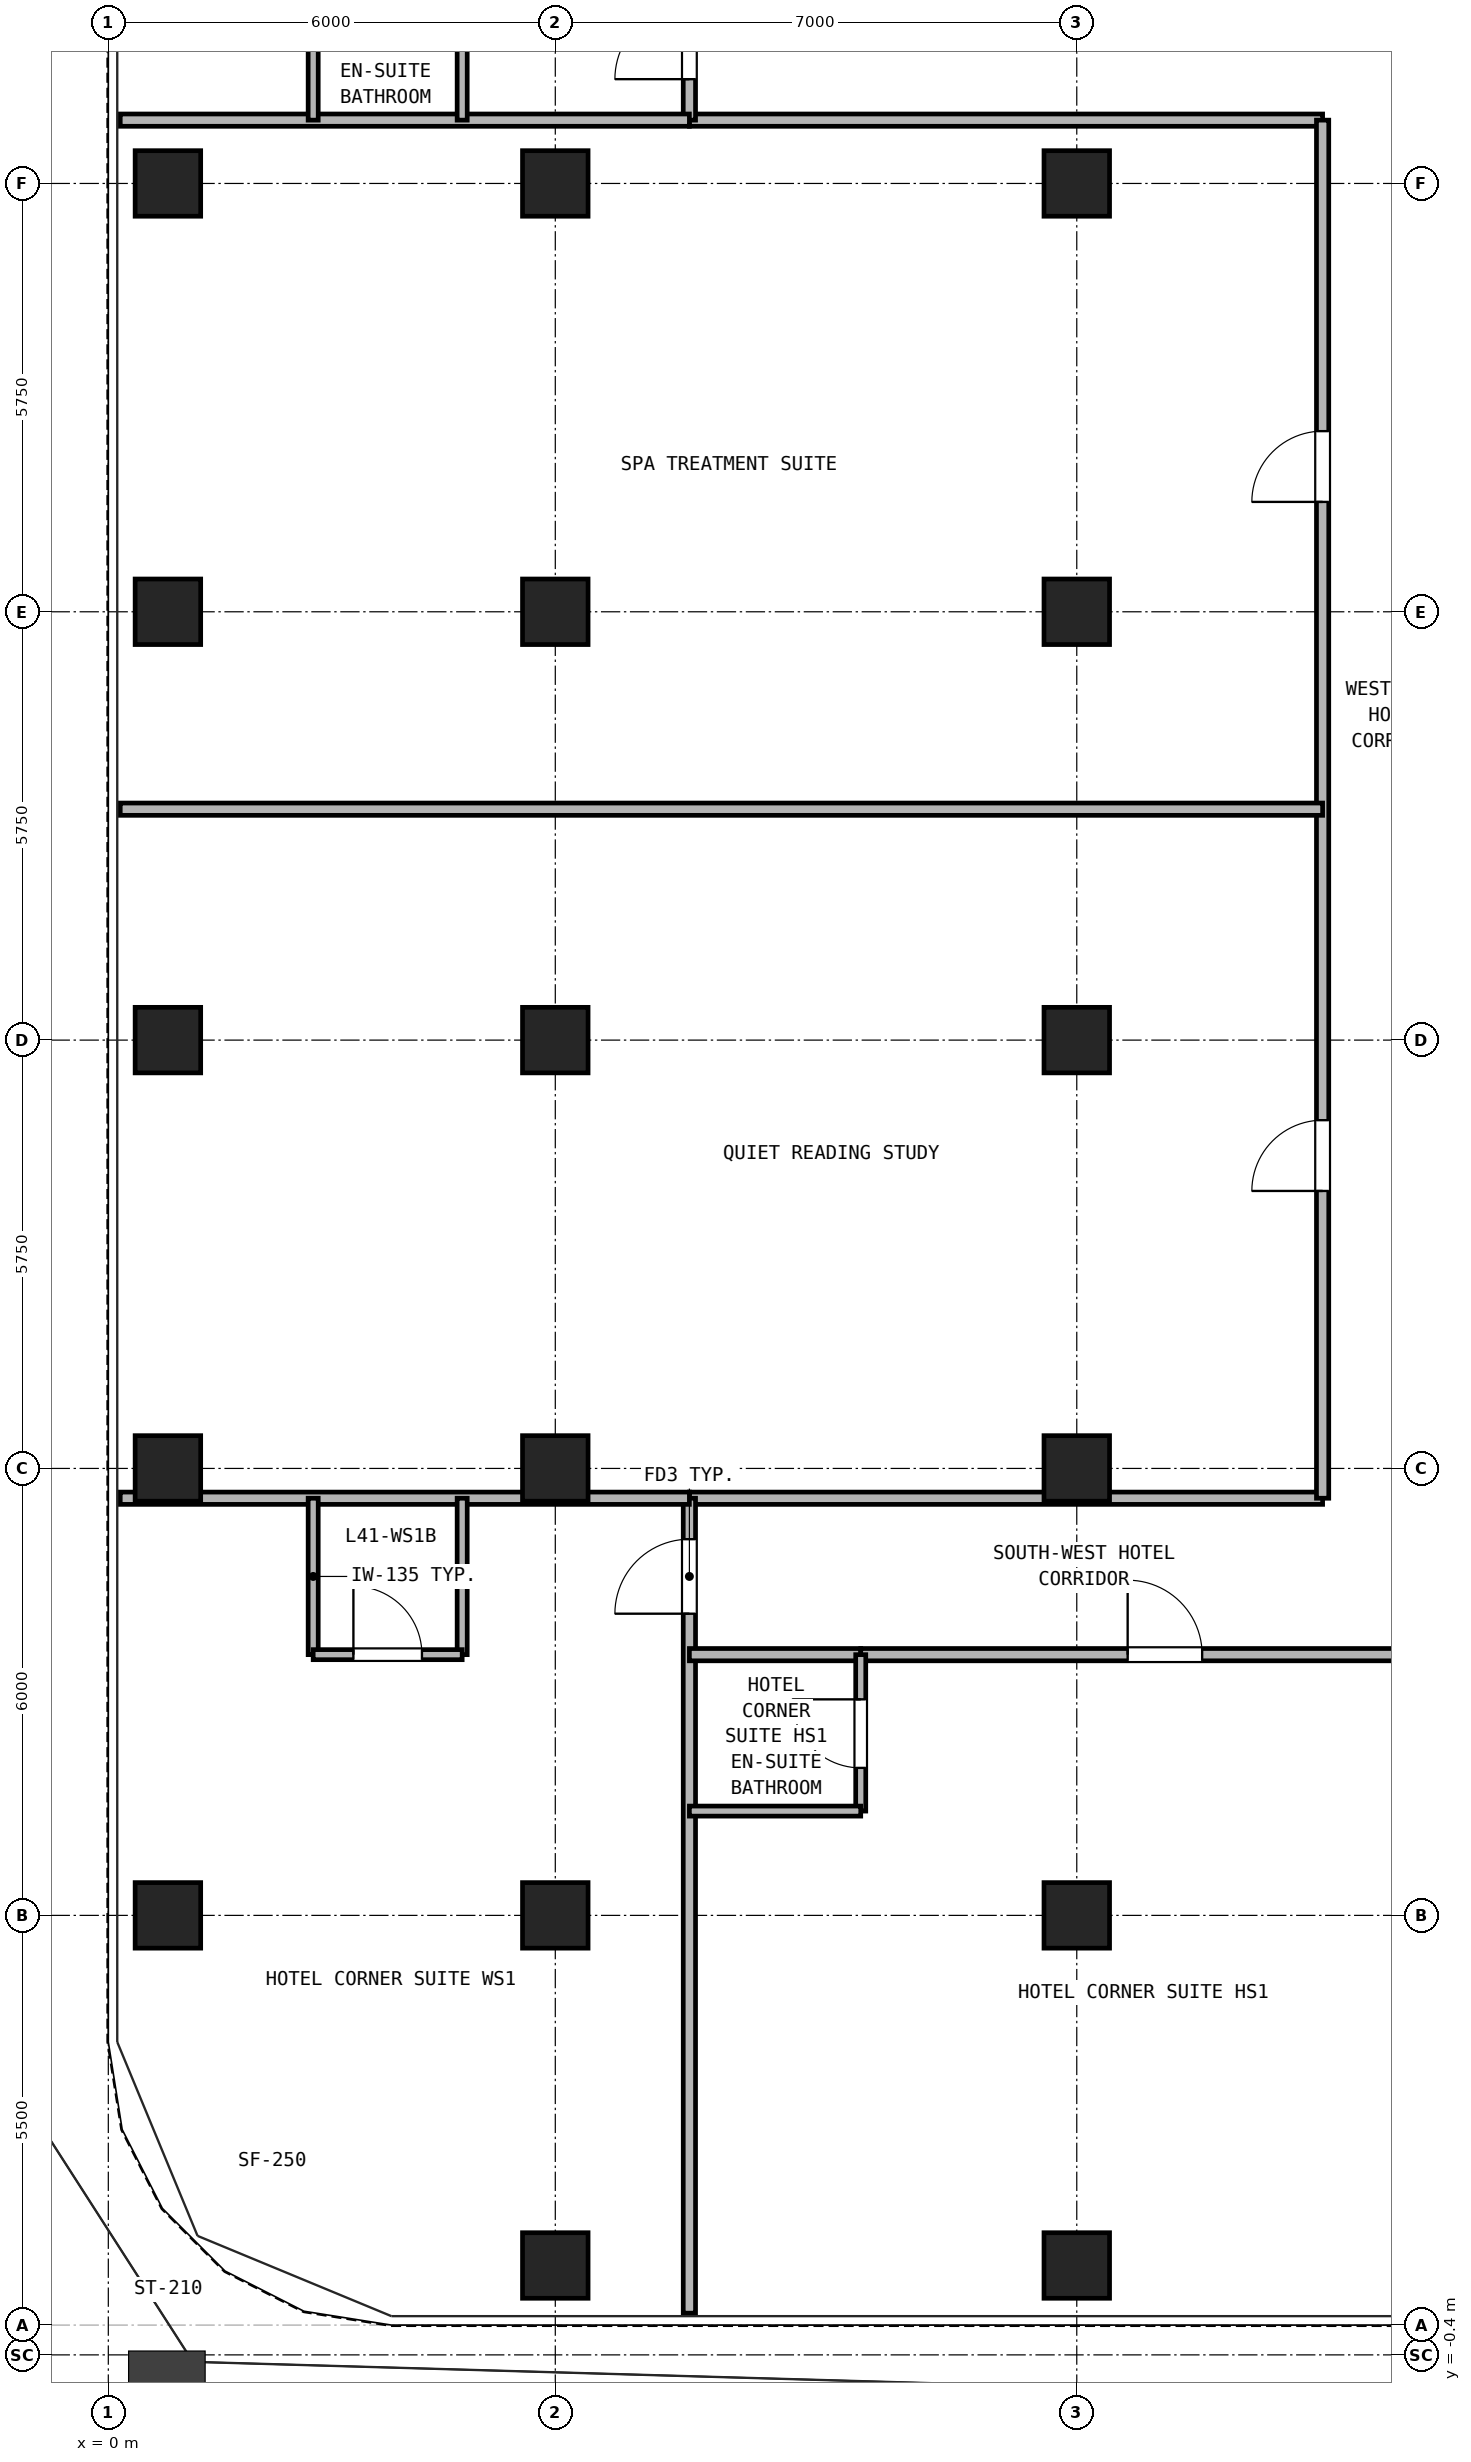
"""IFC4 building model, lengths in metres.
Left out: names, types, materials, properties, quantities, classifications, styles, units other than length and angle.
Written with IfcOpenShell. Run it as: python <this file> out.ifc"""

import sys

from ifc_helpers import new_model, si_unit, direction, frame, frame_2d, origin, origin_2d, place, context, subcontext, project, spatial, rectangle, hollow_rectangle, extrude, source, transform, mapped, element, fill, save


model = new_model("IFC4")
c1 = context("Model", 3, precision=1e-05, world=origin(), true_north=direction((0.0, 1.0)))
c2 = subcontext(c1, "Body", "Model", "MODEL_VIEW")
j1 = project(units=[si_unit("LENGTHUNIT", "METRE"), si_unit("PLANEANGLEUNIT", "RADIAN")], contexts=[c1])
p1 = place(None, origin())
s1 = spatial("IfcSite", under=j1, at=p1, CompositionType="ELEMENT")
p2 = place(p1, origin())
s2 = spatial("IfcBuilding", under=s1, at=p2, CompositionType="ELEMENT")
p3 = place(p2, frame((0.0, 0.0, 148.4)))
s3 = spatial("IfcBuildingStorey", under=s2, at=p3, CompositionType="ELEMENT", Elevation=148.4)
m1 = source(origin(), c2, "Body", "SweptSolid", [
    extrude(hollow_rectangle(XDim=0.88, YDim=0.88, WallThickness=0.05, at=origin_2d()), origin(), (0.0, 0.0, 1.0), 2.84),
])
for number, where, z_axis, x_axis in (
    (1, (6.0, 0.8, 0.0), (0.0, 0.0, 1.0), (1.0, 0.0, 0.0)),
    (2, (13.0, 0.8, 0.0), (0.0, 0.0, 1.0), (1.0, 0.0, 0.0)),
    (3, (0.8, 5.5, 0.0), (0.0, 0.0, 1.0), (1.0, 0.0, 0.0)),
    (4, (0.8, 11.5, 0.0), (0.0, 0.0, 1.0), (1.0, 0.0, 0.0)),
    (5, (0.8, 17.25, 0.0), (0.0, 0.0, 1.0), (1.0, 0.0, 0.0)),
    (6, (0.8, 23.0, 0.0), (0.0, 0.0, 1.0), (1.0, 0.0, 0.0)),
    (7, (0.8, 28.75, 0.0), (0.0, 0.0, 1.0), (1.0, 0.0, 0.0)),
    (8, (6.0, 5.5, 0.0), (0.0, 0.0, 1.0), (1.0, 0.0, 0.0)),
    (9, (6.0, 11.5, 0.0), (0.0, 0.0, 1.0), (1.0, 0.0, 0.0)),
    (10, (6.0, 17.25, 0.0), (0.0, 0.0, 1.0), (1.0, 0.0, 0.0)),
    (11, (6.0, 23.0, 0.0), (0.0, 0.0, 1.0), (1.0, 0.0, 0.0)),
    (12, (6.0, 28.75, 0.0), (0.0, 0.0, 1.0), (1.0, 0.0, 0.0)),
    (13, (13.0, 5.5, 0.0), (0.0, 0.0, 1.0), (1.0, 0.0, 0.0)),
    (14, (13.0, 11.5, 0.0), (0.0, 0.0, 1.0), (1.0, 0.0, 0.0)),
    (15, (13.0, 17.25, 0.0), (0.0, 0.0, 1.0), (1.0, 0.0, 0.0)),
    (16, (13.0, 23.0, 0.0), (0.0, 0.0, 1.0), (1.0, 0.0, 0.0)),
    (17, (13.0, 28.75, 0.0), (0.0, 0.0, 1.0), (1.0, 0.0, 0.0)),
):
    element("IfcColumn", number, at=place(p3, frame(where, z_axis=z_axis, x_axis=x_axis)), inside=s3, PredefinedType="COLUMN", context=c2, shape_type="MappedRepresentation", body=[
        mapped(m1, transform((0.0, 0.0, 0.0), x_axis=(1.0, 0.0, 0.0), y_axis=(0.0, 1.0, 0.0), z_axis=(0.0, 0.0, 1.0), scale=1.0)),
    ])
for number, where, z_axis, x_axis in (
    (18, (7.8, 11.1, 0.0), (0.0, 0.0, 1.0), (1.0, 0.0, 0.0)),
    (19, (7.8, 29.6, 0.0), (0.0, 0.0, 1.0), (1.0, 0.0, 0.0)),
):
    element("IfcWall", number, at=place(p3, frame(where, z_axis=z_axis, x_axis=x_axis)), inside=s3, PredefinedType="PARTITIONING", context=c2, shape_type="SweptSolid", body=[
        extrude(rectangle(XDim=8.5, YDim=0.165, at=frame_2d((4.25, 0.0))), origin(), (0.0, 0.0, 1.0), 2.84),
    ])
p4 = place(p3, frame((16.3, 11.1, 0.0), z_axis=(0.0, 0.0, 1.0), x_axis=(0.0, 1.0, 0.0)))
e20 = element("IfcWall", 20, at=p4, inside=s3, PredefinedType="PARTITIONING", context=c2, shape_type="SweptSolid", body=[
    extrude(rectangle(XDim=18.5, YDim=0.165, at=frame_2d((9.25, 0.0))), origin(), (0.0, 0.0, 1.0), 2.84),
])
p5 = place(p4, frame((4.125, 0.0, 0.0)))
e21 = element("IfcOpeningElement", 21, at=p5, cuts=e20, PredefinedType="OPENING", context=c2, shape_type="SweptSolid", body=[
    extrude(rectangle(XDim=0.95, YDim=2.15, at=frame_2d((0.475, 1.075))), frame((0.0, 0.093, 0.0), z_axis=(0.0, -1.0, 0.0), x_axis=(1.0, 0.0, 0.0)), (0.0, 0.0, 1.0), 0.185),
])
p6 = place(p4, frame((13.375, 0.0, 0.0)))
e22 = element("IfcOpeningElement", 22, at=p6, cuts=e20, PredefinedType="OPENING", context=c2, shape_type="SweptSolid", body=[
    extrude(rectangle(XDim=0.95, YDim=2.15, at=frame_2d((0.475, 1.075))), frame((0.0, 0.093, 0.0), z_axis=(0.0, -1.0, 0.0), x_axis=(1.0, 0.0, 0.0)), (0.0, 0.0, 1.0), 0.185),
])
p7 = place(p3, frame((7.8, 0.16, 0.0), z_axis=(0.0, 0.0, 1.0), x_axis=(0.0, 1.0, 0.0)))
e23 = element("IfcWall", 23, at=p7, inside=s3, PredefinedType="PARTITIONING", context=c2, shape_type="SweptSolid", body=[
    extrude(rectangle(XDim=10.94, YDim=0.165, at=frame_2d((5.47, 0.0))), origin(), (0.0, 0.0, 1.0), 2.84),
])
p8 = place(p7, frame((9.39, 0.0, 0.0)))
e24 = element("IfcOpeningElement", 24, at=p8, cuts=e23, PredefinedType="OPENING", context=c2, shape_type="SweptSolid", body=[
    extrude(rectangle(XDim=1.0, YDim=2.15, at=frame_2d((0.5, 1.075))), frame((0.0, 0.093, 0.0), z_axis=(0.0, -1.0, 0.0), x_axis=(1.0, 0.0, 0.0)), (0.0, 0.0, 1.0), 0.185),
])
p9 = place(p3, frame((7.8, 29.6, 0.0), z_axis=(0.0, 0.0, 1.0), x_axis=(0.0, 1.0, 0.0)))
e25 = element("IfcWall", 25, at=p9, inside=s3, PredefinedType="PARTITIONING", context=c2, shape_type="SweptSolid", body=[
    extrude(rectangle(XDim=5.54, YDim=0.165, at=frame_2d((2.77, 0.0))), origin(), (0.0, 0.0, 1.0), 2.84),
])
p10 = place(p9, frame((0.55, 0.0, 0.0)))
e26 = element("IfcOpeningElement", 26, at=p10, cuts=e25, PredefinedType="OPENING", context=c2, shape_type="SweptSolid", body=[
    extrude(rectangle(XDim=1.0, YDim=2.15, at=frame_2d((0.5, 1.075))), frame((0.0, 0.093, 0.0), z_axis=(0.0, -1.0, 0.0), x_axis=(1.0, 0.0, 0.0)), (0.0, 0.0, 1.0), 0.185),
])
for number, where, z_axis, x_axis in (
    (27, (0.16, 11.1, 0.0), (0.0, 0.0, 1.0), (1.0, 0.0, 0.0)),
    (28, (0.16, 29.6, 0.0), (0.0, 0.0, 1.0), (1.0, 0.0, 0.0)),
):
    element("IfcWall", number, at=place(p3, frame(where, z_axis=z_axis, x_axis=x_axis)), inside=s3, PredefinedType="PARTITIONING", context=c2, shape_type="SweptSolid", body=[
        extrude(rectangle(XDim=7.64, YDim=0.165, at=frame_2d((3.82, 0.0))), origin(), (0.0, 0.0, 1.0), 2.84),
    ])
for number, where, z_axis, x_axis in (
    (29, (2.75, 9.0, 0.0), (0.0, 0.0, 1.0), (0.0, 1.0, 0.0)),
    (30, (4.75, 9.0, 0.0), (0.0, 0.0, 1.0), (0.0, 1.0, 0.0)),
):
    element("IfcWall", number, at=place(p3, frame(where, z_axis=z_axis, x_axis=x_axis)), inside=s3, PredefinedType="PARTITIONING", context=c2, shape_type="SweptSolid", body=[
        extrude(rectangle(XDim=2.1, YDim=0.135, at=frame_2d((1.05, 0.0))), origin(), (0.0, 0.0, 1.0), 2.84),
    ])
p11 = place(p3, frame((2.75, 9.0, 0.0), z_axis=(0.0, 0.0, 1.0), x_axis=(1.0, 0.0, 0.0)))
e31 = element("IfcWall", 31, at=p11, inside=s3, PredefinedType="PARTITIONING", context=c2, shape_type="SweptSolid", body=[
    extrude(rectangle(XDim=2.0, YDim=0.135, at=frame_2d((1.0, 0.0))), origin(), (0.0, 0.0, 1.0), 2.84),
])
p12 = place(p11, frame((0.54, 0.0, 0.0)))
e32 = element("IfcOpeningElement", 32, at=p12, cuts=e31, PredefinedType="OPENING", context=c2, shape_type="SweptSolid", body=[
    extrude(rectangle(XDim=0.92, YDim=2.1, at=frame_2d((0.46, 1.05))), frame((0.0, 0.077, 0.0), z_axis=(0.0, -1.0, 0.0), x_axis=(1.0, 0.0, 0.0)), (0.0, 0.0, 1.0), 0.155),
])
for number, where, z_axis, x_axis in (
    (33, (2.75, 29.6, 0.0), (0.0, 0.0, 1.0), (0.0, 1.0, 0.0)),
    (34, (4.75, 29.6, 0.0), (0.0, 0.0, 1.0), (0.0, 1.0, 0.0)),
):
    element("IfcWall", number, at=place(p3, frame(where, z_axis=z_axis, x_axis=x_axis)), inside=s3, PredefinedType="PARTITIONING", context=c2, shape_type="SweptSolid", body=[
        extrude(rectangle(XDim=2.1, YDim=0.135, at=frame_2d((1.05, 0.0))), origin(), (0.0, 0.0, 1.0), 2.84),
    ])
p13 = place(p3, frame((7.8, 9.0, 0.0), z_axis=(0.0, 0.0, 1.0), x_axis=(1.0, 0.0, 0.0)))
e35 = element("IfcWall", 35, at=p13, inside=s3, PredefinedType="PARTITIONING", context=c2, shape_type="SweptSolid", body=[
    extrude(rectangle(XDim=2.3, YDim=0.165, at=frame_2d((1.15, 0.0))), origin(), (0.0, 0.0, 1.0), 2.84),
])
p14 = place(p3, frame((10.1, 9.0, 0.0), z_axis=(0.0, 0.0, 1.0), x_axis=(1.0, 0.0, 0.0)))
e36 = element("IfcWall", 36, at=p14, inside=s3, PredefinedType="PARTITIONING", context=c2, shape_type="SweptSolid", body=[
    extrude(rectangle(XDim=8.167, YDim=0.165, at=frame_2d((4.083, 0.0))), origin(), (0.0, 0.0, 1.0), 2.84),
])
p15 = place(p14, frame((3.583, 0.0, 0.0)))
e37 = element("IfcOpeningElement", 37, at=p15, cuts=e36, PredefinedType="OPENING", context=c2, shape_type="SweptSolid", body=[
    extrude(rectangle(XDim=1.0, YDim=2.15, at=frame_2d((0.5, 1.075))), frame((0.0, 0.093, 0.0), z_axis=(0.0, -1.0, 0.0), x_axis=(1.0, 0.0, 0.0)), (0.0, 0.0, 1.0), 0.185),
])
p16 = place(p3, frame((10.1, 6.9, 0.0), z_axis=(0.0, 0.0, 1.0), x_axis=(0.0, 1.0, 0.0)))
e38 = element("IfcWall", 38, at=p16, inside=s3, PredefinedType="PARTITIONING", context=c2, shape_type="SweptSolid", body=[
    extrude(rectangle(XDim=2.1, YDim=0.135, at=frame_2d((1.05, 0.0))), origin(), (0.0, 0.0, 1.0), 2.84),
])
p17 = place(p16, frame((0.58, 0.0, 0.0)))
e39 = element("IfcOpeningElement", 39, at=p17, cuts=e38, PredefinedType="OPENING", context=c2, shape_type="SweptSolid", body=[
    extrude(rectangle(XDim=0.92, YDim=2.1, at=frame_2d((0.46, 1.05))), frame((0.0, 0.077, 0.0), z_axis=(0.0, -1.0, 0.0), x_axis=(1.0, 0.0, 0.0)), (0.0, 0.0, 1.0), 0.155),
])
p18 = place(p3, frame((7.8, 6.9, 0.0), z_axis=(0.0, 0.0, 1.0), x_axis=(1.0, 0.0, 0.0)))
e40 = element("IfcWall", 40, at=p18, inside=s3, PredefinedType="PARTITIONING", context=c2, shape_type="SweptSolid", body=[
    extrude(rectangle(XDim=2.3, YDim=0.135, at=frame_2d((1.15, 0.0))), origin(), (0.0, 0.0, 1.0), 2.84),
])
p19 = place(p3, frame((0.16, 20.35, 0.0), z_axis=(0.0, 0.0, 1.0), x_axis=(1.0, 0.0, 0.0)))
e41 = element("IfcWall", 41, at=p19, inside=s3, PredefinedType="PARTITIONING", context=c2, shape_type="SweptSolid", body=[
    extrude(rectangle(XDim=16.14, YDim=0.165, at=frame_2d((8.07, 0.0))), origin(), (0.0, 0.0, 1.0), 2.473),
])
p20 = place(p12, origin())
e42 = element("IfcDoor", 42, at=p20, inside=s3, OperationType="SINGLE_SWING_LEFT", PredefinedType="DOOR", context=c2, shape_type="SweptSolid", body=[
    extrude(rectangle(XDim=0.92, YDim=2.1, at=frame_2d((0.46, 1.05))), frame((0.0, 0.025, 0.0), z_axis=(0.0, -1.0, 0.0), x_axis=(1.0, 0.0, 0.0)), (0.0, 0.0, 1.0), 0.05),
])
fill(e32, e42)
p21 = place(p8, origin())
e43 = element("IfcDoor", 43, at=p21, inside=s3, OperationType="SINGLE_SWING_LEFT", PredefinedType="DOOR", context=c2, shape_type="SweptSolid", body=[
    extrude(rectangle(XDim=1.0, YDim=2.15, at=frame_2d((0.5, 1.075))), frame((0.0, 0.025, 0.0), z_axis=(0.0, -1.0, 0.0), x_axis=(1.0, 0.0, 0.0)), (0.0, 0.0, 1.0), 0.05),
])
fill(e24, e43)
p22 = place(p10, origin())
e44 = element("IfcDoor", 44, at=p22, inside=s3, OperationType="SINGLE_SWING_LEFT", PredefinedType="DOOR", context=c2, shape_type="SweptSolid", body=[
    extrude(rectangle(XDim=1.0, YDim=2.15, at=frame_2d((0.5, 1.075))), frame((0.0, 0.025, 0.0), z_axis=(0.0, -1.0, 0.0), x_axis=(1.0, 0.0, 0.0)), (0.0, 0.0, 1.0), 0.05),
])
fill(e26, e44)
p23 = place(p17, frame((0.92, 0.0, 0.0), z_axis=(0.0, 0.0, 1.0), x_axis=(-1.0, 0.0, 0.0)))
e45 = element("IfcDoor", 45, at=p23, inside=s3, OperationType="SINGLE_SWING_RIGHT", PredefinedType="DOOR", context=c2, shape_type="SweptSolid", body=[
    extrude(rectangle(XDim=0.92, YDim=2.1, at=frame_2d((0.46, 1.05))), frame((0.0, 0.025, 0.0), z_axis=(0.0, -1.0, 0.0), x_axis=(1.0, 0.0, 0.0)), (0.0, 0.0, 1.0), 0.05),
])
fill(e39, e45)
p24 = place(p15, frame((1.0, 0.0, 0.0), z_axis=(0.0, 0.0, 1.0), x_axis=(-1.0, 0.0, 0.0)))
e46 = element("IfcDoor", 46, at=p24, inside=s3, OperationType="SINGLE_SWING_LEFT", PredefinedType="DOOR", context=c2, shape_type="SweptSolid", body=[
    extrude(rectangle(XDim=1.0, YDim=2.15, at=frame_2d((0.5, 1.075))), frame((0.0, 0.025, 0.0), z_axis=(0.0, -1.0, 0.0), x_axis=(1.0, 0.0, 0.0)), (0.0, 0.0, 1.0), 0.05),
])
fill(e37, e46)
p25 = place(p5, frame((0.95, 0.0, 0.0), z_axis=(0.0, 0.0, 1.0), x_axis=(-1.0, 0.0, 0.0)))
e47 = element("IfcDoor", 47, at=p25, inside=s3, OperationType="SINGLE_SWING_LEFT", PredefinedType="DOOR", context=c2, shape_type="SweptSolid", body=[
    extrude(rectangle(XDim=0.95, YDim=2.15, at=frame_2d((0.475, 1.075))), frame((0.0, 0.025, 0.0), z_axis=(0.0, -1.0, 0.0), x_axis=(1.0, 0.0, 0.0)), (0.0, 0.0, 1.0), 0.05),
])
fill(e21, e47)
p26 = place(p6, frame((0.95, 0.0, 0.0), z_axis=(0.0, 0.0, 1.0), x_axis=(-1.0, 0.0, 0.0)))
e48 = element("IfcDoor", 48, at=p26, inside=s3, OperationType="SINGLE_SWING_LEFT", PredefinedType="DOOR", context=c2, shape_type="SweptSolid", body=[
    extrude(rectangle(XDim=0.95, YDim=2.15, at=frame_2d((0.475, 1.075))), frame((0.0, 0.025, 0.0), z_axis=(0.0, -1.0, 0.0), x_axis=(1.0, 0.0, 0.0)), (0.0, 0.0, 1.0), 0.05),
])
fill(e22, e48)
save(model, sys.argv[1])
